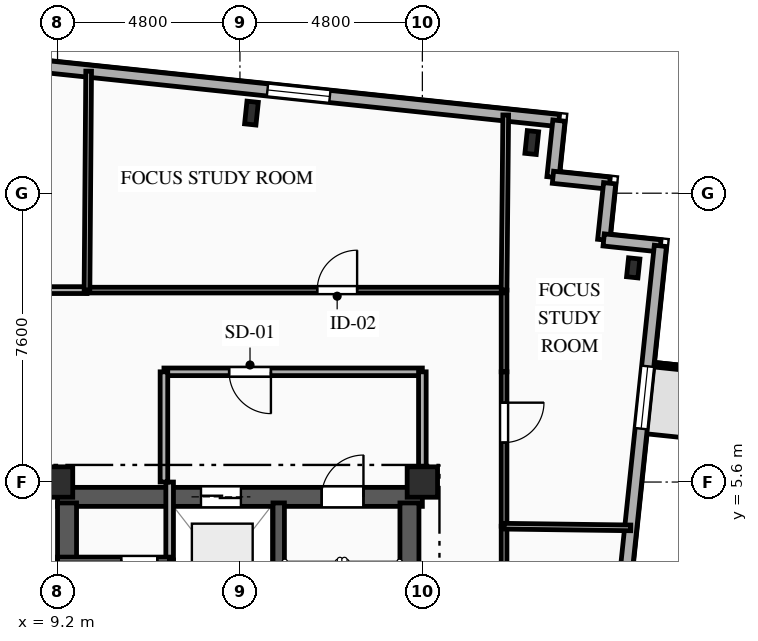
"""IFC4 building model, lengths in metres.
Left out: names, types, materials, properties, quantities, classifications, styles, units other than length and angle.
Written with IfcOpenShell. Run it as: python <this file> out.ifc"""

import sys

from ifc_helpers import new_model, si_unit, direction, frame, frame_2d, origin, origin_2d, place, context, subcontext, project, spatial, rectangle, i_section, extrude, element, fill, save


model = new_model("IFC4")
c1 = context("Model", 3, precision=1e-05, world=origin(), true_north=direction((0.0, 1.0)))
c2 = subcontext(c1, "Body", "Model", "MODEL_VIEW")
j1 = project(units=[si_unit("LENGTHUNIT", "METRE"), si_unit("PLANEANGLEUNIT", "RADIAN")], contexts=[c1])
p1 = place(None, origin())
s1 = spatial("IfcSite", under=j1, at=p1, CompositionType="ELEMENT")
p2 = place(p1, origin())
s2 = spatial("IfcBuilding", under=s1, at=p2, CompositionType="ELEMENT")
p3 = place(p2, frame((0.0, 0.0, 193.05)))
s3 = spatial("IfcBuildingStorey", under=s2, at=p3, CompositionType="ELEMENT", Elevation=193.05)
for number, where, z_axis, x_axis in (
    (1, (9.2, 5.6, 0.0), (0.0, 0.0, 1.0), (1.0, 0.0, 0.0)),
    (2, (18.8, 5.6, 0.0), (0.0, 0.0, 1.0), (1.0, 0.0, 0.0)),
):
    element("IfcColumn", number, at=place(p3, frame(where, z_axis=z_axis, x_axis=x_axis)), inside=s3, PredefinedType="COLUMN", context=c2, shape_type="SweptSolid", body=[
        extrude(rectangle(XDim=0.8, YDim=0.8, at=origin_2d()), origin(), (0.0, 0.0, 1.0), 3.35),
    ])
for number, where, z_axis, x_axis in (
    (3, (21.679, 14.532, 0.0), (0.0, 0.0, 1.0), (0.995, -0.105, 0.0)),
    (4, (14.303, 15.308, 0.0), (0.0, 0.0, 1.0), (0.995, -0.105, 0.0)),
):
    element("IfcColumn", number, at=place(p3, frame(where, z_axis=z_axis, x_axis=x_axis)), inside=s3, PredefinedType="COLUMN", context=c2, shape_type="SweptSolid", body=[
        extrude(i_section(OverallWidth=0.3, OverallDepth=0.6, WebThickness=0.015, FlangeThickness=0.03, FilletRadius=0.027, at=origin_2d()), origin(), (0.0, 0.0, 1.0), 3.35),
    ])
p4 = place(p3, frame((24.349, 11.235, 0.0), z_axis=(0.0, 0.0, 1.0), x_axis=(0.994521895368, -0.104528463268, 0.0)))
e5 = element("IfcColumn", 5, at=p4, inside=s3, PredefinedType="COLUMN", context=c2, shape_type="SweptSolid", body=[
    extrude(i_section(OverallWidth=0.3, OverallDepth=0.5, WebThickness=0.014, FlangeThickness=0.028, FilletRadius=0.027, at=origin_2d()), origin(), (0.0, 0.0, 1.0), 3.35),
])
p5 = place(p3, frame((-23.156, 19.898, 0.0), z_axis=(0.0, 0.0, 1.0), x_axis=(0.994522001802, -0.104527450613, 0.0)))
e6 = element("IfcWall", 6, at=p5, inside=s3, PredefinedType="SOLIDWALL", context=c2, shape_type="SweptSolid", body=[
    extrude(rectangle(XDim=45.8, YDim=0.32, at=frame_2d((22.9, 0.0))), origin(), (0.0, 0.0, 1.0), 3.04),
])
p6 = place(p5, frame((4.019, 0.0, 0.85)))
e7 = element("IfcOpeningElement", 7, at=p6, cuts=e6, PredefinedType="OPENING", context=c2, shape_type="SweptSolid", body=[
    extrude(rectangle(XDim=1.65, YDim=1.85, at=frame_2d((0.825, 0.925))), frame((0.0, 0.17, 0.0), z_axis=(0.0, -1.0, 0.0), x_axis=(1.0, 0.0, 0.0)), (0.0, 0.0, 1.0), 0.34),
])
p7 = place(p5, frame((9.024, 0.0, 0.85)))
e8 = element("IfcOpeningElement", 8, at=p7, cuts=e6, PredefinedType="OPENING", context=c2, shape_type="SweptSolid", body=[
    extrude(rectangle(XDim=1.65, YDim=1.85, at=frame_2d((0.825, 0.925))), frame((0.0, 0.17, 0.0), z_axis=(0.0, -1.0, 0.0), x_axis=(1.0, 0.0, 0.0)), (0.0, 0.0, 1.0), 0.34),
])
p8 = place(p5, frame((18.066, 0.0, 0.85)))
e9 = element("IfcOpeningElement", 9, at=p8, cuts=e6, PredefinedType="OPENING", context=c2, shape_type="SweptSolid", body=[
    extrude(rectangle(XDim=1.5, YDim=1.85, at=frame_2d((0.75, 0.925))), frame((0.0, 0.17, 0.0), z_axis=(0.0, -1.0, 0.0), x_axis=(1.0, 0.0, 0.0)), (0.0, 0.0, 1.0), 0.34),
])
p9 = place(p5, frame((27.045, 0.0, 0.85)))
e10 = element("IfcOpeningElement", 10, at=p9, cuts=e6, PredefinedType="OPENING", context=c2, shape_type="SweptSolid", body=[
    extrude(rectangle(XDim=2.2, YDim=1.85, at=frame_2d((1.1, 0.925))), frame((0.0, 0.17, 0.0), z_axis=(0.0, -1.0, 0.0), x_axis=(1.0, 0.0, 0.0)), (0.0, 0.0, 1.0), 0.34),
])
p10 = place(p5, frame((38.089, 0.0, 0.85)))
e11 = element("IfcOpeningElement", 11, at=p10, cuts=e6, PredefinedType="OPENING", context=c2, shape_type="SweptSolid", body=[
    extrude(rectangle(XDim=1.65, YDim=1.85, at=frame_2d((0.825, 0.925))), frame((0.0, 0.17, 0.0), z_axis=(0.0, -1.0, 0.0), x_axis=(1.0, 0.0, 0.0)), (0.0, 0.0, 1.0), 0.34),
])
p11 = place(p3, frame((22.393, 15.111, 0.0), z_axis=(0.0, 0.0, 1.0), x_axis=(-0.104481464157, -0.994526834051, 0.0)))
e12 = element("IfcWall", 12, at=p11, inside=s3, PredefinedType="SOLIDWALL", context=c2, shape_type="SweptSolid", body=[
    extrude(rectangle(XDim=1.5, YDim=0.32, at=frame_2d((0.75, 0.0))), origin(), (0.0, 0.0, 1.0), 3.04),
])
for number, where, z_axis, x_axis in (
    (13, (22.237, 13.619, 0.0), (0.0, 0.0, 1.0), (0.995, -0.104, 0.0)),
    (14, (23.728, 13.462, 0.0), (0.0, 0.0, 1.0), (-0.104, -0.995, 0.0)),
    (15, (23.572, 11.971, 0.0), (0.0, 0.0, 1.0), (0.995, -0.105, 0.0)),
):
    element("IfcWall", number, at=place(p3, frame(where, z_axis=z_axis, x_axis=x_axis)), inside=s3, PredefinedType="SOLIDWALL", context=c2, shape_type="SweptSolid", body=[
        extrude(rectangle(XDim=1.5, YDim=0.32, at=frame_2d((0.75, 0.0))), origin(), (0.0, 0.0, 1.0), 3.04),
    ])
p12 = place(p3, frame((25.063, 11.814, 0.0), z_axis=(0.0, 0.0, 1.0), x_axis=(-0.104523275986, -0.99452244056, 0.0)))
e16 = element("IfcWall", 16, at=p12, inside=s3, PredefinedType="SOLIDWALL", context=c2, shape_type="SweptSolid", body=[
    extrude(rectangle(XDim=28.8, YDim=0.32, at=frame_2d((14.4, 0.0))), origin(), (0.0, 0.0, 1.0), 3.04),
])
p13 = place(p12, frame((3.186, 0.0, 0.85)))
e17 = element("IfcOpeningElement", 17, at=p13, cuts=e16, PredefinedType="OPENING", context=c2, shape_type="SweptSolid", body=[
    extrude(rectangle(XDim=1.65, YDim=1.85, at=frame_2d((0.825, 0.925))), frame((0.0, 0.17, 0.0), z_axis=(0.0, -1.0, 0.0), x_axis=(1.0, 0.0, 0.0)), (0.0, 0.0, 1.0), 0.34),
])
p14 = place(p12, frame((11.93, 0.0, 0.85)))
e18 = element("IfcOpeningElement", 18, at=p14, cuts=e16, PredefinedType="OPENING", context=c2, shape_type="SweptSolid", body=[
    extrude(rectangle(XDim=1.65, YDim=1.85, at=frame_2d((0.825, 0.925))), frame((0.0, 0.17, 0.0), z_axis=(0.0, -1.0, 0.0), x_axis=(1.0, 0.0, 0.0)), (0.0, 0.0, 1.0), 0.34),
])
p15 = place(p12, frame((22.359, 0.0, 0.85)))
e19 = element("IfcOpeningElement", 19, at=p15, cuts=e16, PredefinedType="OPENING", context=c2, shape_type="SweptSolid", body=[
    extrude(rectangle(XDim=1.65, YDim=1.85, at=frame_2d((0.825, 0.925))), frame((0.0, 0.17, 0.0), z_axis=(0.0, -1.0, 0.0), x_axis=(1.0, 0.0, 0.0)), (0.0, 0.0, 1.0), 0.34),
])
p16 = place(p3, frame((9.2, 5.21, 0.0), z_axis=(0.0, 0.0, 1.0), x_axis=(1.0, 0.0, 0.0)))
e20 = element("IfcWall", 20, at=p16, inside=s3, PredefinedType="SHEAR", context=c2, shape_type="SweptSolid", body=[
    extrude(rectangle(XDim=9.6, YDim=0.5, at=frame_2d((4.8, 0.0))), origin(), (0.0, 0.0, 1.0), 3.04),
])
p17 = place(p16, frame((6.95, 0.0, 0.0)))
e21 = element("IfcOpeningElement", 21, at=p17, cuts=e20, PredefinedType="OPENING", context=c2, shape_type="SweptSolid", body=[
    extrude(rectangle(XDim=1.1, YDim=2.15, at=frame_2d((0.55, 1.075))), frame((0.0, 0.26, 0.0), z_axis=(0.0, -1.0, 0.0), x_axis=(1.0, 0.0, 0.0)), (0.0, 0.0, 1.0), 0.52),
])
p18 = place(p16, frame((3.775, 0.0, 0.0)))
e22 = element("IfcOpeningElement", 22, at=p18, cuts=e20, PredefinedType="OPENING", context=c2, shape_type="SweptSolid", body=[
    extrude(rectangle(XDim=1.05, YDim=2.1, at=frame_2d((0.525, 1.05))), frame((0.0, 0.26, 0.0), z_axis=(0.0, -1.0, 0.0), x_axis=(1.0, 0.0, 0.0)), (0.0, 0.0, 1.0), 0.52),
])
p19 = place(p3, frame((9.45, -5.05, 0.0), z_axis=(0.0, 0.0, 1.0), x_axis=(0.0, 1.0, 0.0)))
e23 = element("IfcWall", 23, at=p19, inside=s3, PredefinedType="SHEAR", context=c2, shape_type="SweptSolid", body=[
    extrude(rectangle(XDim=10.1, YDim=0.5, at=frame_2d((5.05, 0.0))), origin(), (0.0, 0.0, 1.0), 3.04),
])
p20 = place(p19, frame((7.15, 0.0, 0.0)))
e24 = element("IfcOpeningElement", 24, at=p20, cuts=e23, PredefinedType="OPENING", context=c2, shape_type="SweptSolid", body=[
    extrude(rectangle(XDim=0.9, YDim=2.1, at=frame_2d((0.45, 1.05))), frame((0.0, 0.26, 0.0), z_axis=(0.0, -1.0, 0.0), x_axis=(1.0, 0.0, 0.0)), (0.0, 0.0, 1.0), 0.52),
])
p21 = place(p19, frame((2.4, 0.0, 0.0)))
e25 = element("IfcOpeningElement", 25, at=p21, cuts=e23, PredefinedType="OPENING", context=c2, shape_type="SweptSolid", body=[
    extrude(rectangle(XDim=1.2, YDim=2.15, at=frame_2d((0.6, 1.075))), frame((0.0, 0.26, 0.0), z_axis=(0.0, -1.0, 0.0), x_axis=(1.0, 0.0, 0.0)), (0.0, 0.0, 1.0), 0.52),
])
p22 = place(p3, frame((18.46, -5.05, 0.0), z_axis=(0.0, 0.0, 1.0), x_axis=(0.0, 1.0, 0.0)))
e26 = element("IfcWall", 26, at=p22, inside=s3, PredefinedType="SHEAR", context=c2, shape_type="SweptSolid", body=[
    extrude(rectangle(XDim=10.1, YDim=0.5, at=frame_2d((5.05, 0.0))), origin(), (0.0, 0.0, 1.0), 3.04),
])
p23 = place(p3, frame((15.02, -5.05, 0.0), z_axis=(0.0, 0.0, 1.0), x_axis=(0.0, 1.0, 0.0)))
e27 = element("IfcWall", 27, at=p23, inside=s3, PredefinedType="SHEAR", context=c2, shape_type="SweptSolid", body=[
    extrude(rectangle(XDim=10.1, YDim=0.3, at=frame_2d((5.05, 0.0))), origin(), (0.0, 0.0, 1.0), 3.04),
])
p24 = place(p3, frame((12.15, 3.55, 0.0), z_axis=(0.0, 0.0, 1.0), x_axis=(0.0, -1.0, 0.0)))
e28 = element("IfcWall", 28, at=p24, inside=s3, PredefinedType="PARTITIONING", context=c2, shape_type="SweptSolid", body=[
    extrude(rectangle(XDim=2.0, YDim=0.2, at=frame_2d((1.0, 0.0))), origin(), (0.0, 0.0, 1.0), 3.04),
])
p25 = place(p3, frame((12.15, 5.6, 0.0), z_axis=(0.0, 0.0, 1.0), x_axis=(0.0, -1.0, 0.0)))
e29 = element("IfcWall", 29, at=p25, inside=s3, PredefinedType="PARTITIONING", context=c2, shape_type="SweptSolid", body=[
    extrude(rectangle(XDim=2.05, YDim=0.2, at=frame_2d((1.025, 0.0))), origin(), (0.0, 0.0, 1.0), 3.04),
])
p26 = place(p3, frame((18.8, 8.5, 0.0), z_axis=(0.0, 0.0, 1.0), x_axis=(-1.0, 0.0, 0.0)))
e30 = element("IfcWall", 30, at=p26, inside=s3, PredefinedType="PARTITIONING", context=c2, shape_type="SweptSolid", body=[
    extrude(rectangle(XDim=6.8, YDim=0.2, at=frame_2d((3.4, 0.0))), origin(), (0.0, 0.0, 1.0), 3.04),
])
p27 = place(p26, frame((3.985, 0.0, 0.0)))
e31 = element("IfcOpeningElement", 31, at=p27, cuts=e30, PredefinedType="OPENING", context=c2, shape_type="SweptSolid", body=[
    extrude(rectangle(XDim=1.1, YDim=2.15, at=frame_2d((0.55, 1.075))), frame((0.0, 0.11, 0.0), z_axis=(0.0, -1.0, 0.0), x_axis=(1.0, 0.0, 0.0)), (0.0, 0.0, 1.0), 0.22),
])
p28 = place(p3, frame((18.8, 5.6, 0.0), z_axis=(0.0, 0.0, 1.0), x_axis=(0.0, 1.0, 0.0)))
e32 = element("IfcWall", 32, at=p28, inside=s3, PredefinedType="PARTITIONING", context=c2, shape_type="SweptSolid", body=[
    extrude(rectangle(XDim=2.9, YDim=0.2, at=frame_2d((1.45, 0.0))), origin(), (0.0, 0.0, 1.0), 2.665),
])
p29 = place(p3, frame((12.0, 8.5, 0.0), z_axis=(0.0, 0.0, 1.0), x_axis=(0.0, -1.0, 0.0)))
e33 = element("IfcWall", 33, at=p29, inside=s3, PredefinedType="PARTITIONING", context=c2, shape_type="SweptSolid", body=[
    extrude(rectangle(XDim=2.9, YDim=0.2, at=frame_2d((1.45, 0.0))), origin(), (0.0, 0.0, 1.0), 3.04),
])
p30 = place(p3, frame((12.15, 3.55, 0.0), z_axis=(0.0, 0.0, 1.0), x_axis=(-1.0, 0.0, 0.0)))
e34 = element("IfcWall", 34, at=p30, inside=s3, PredefinedType="PARTITIONING", context=c2, shape_type="SweptSolid", body=[
    extrude(rectangle(XDim=2.95, YDim=0.15, at=frame_2d((1.475, 0.0))), origin(), (0.0, 0.0, 1.0), 3.04),
])
p31 = place(p30, frame((0.325, 0.0, 0.0)))
e35 = element("IfcOpeningElement", 35, at=p31, cuts=e34, PredefinedType="OPENING", context=c2, shape_type="SweptSolid", body=[
    extrude(rectangle(XDim=0.95, YDim=2.1, at=frame_2d((0.475, 1.05))), frame((0.0, 0.085, 0.0), z_axis=(0.0, -1.0, 0.0), x_axis=(1.0, 0.0, 0.0)), (0.0, 0.0, 1.0), 0.17),
])
p32 = place(p3, frame((20.95, 10.65, 0.0), z_axis=(0.0, 0.0, 1.0), x_axis=(0.0, -1.0, 0.0)))
e36 = element("IfcWall", 36, at=p32, inside=s3, PredefinedType="PARTITIONING", context=c2, shape_type="SweptSolid", body=[
    extrude(rectangle(XDim=2.15, YDim=0.15, at=frame_2d((1.075, 0.0))), origin(), (0.0, 0.0, 1.0), 3.04),
])
p33 = place(p3, frame((1.95, 10.65, 0.0), z_axis=(0.0, 0.0, 1.0), x_axis=(1.0, 0.0, 0.0)))
e37 = element("IfcWall", 37, at=p33, inside=s3, PredefinedType="PARTITIONING", context=c2, shape_type="SweptSolid", body=[
    extrude(rectangle(XDim=8.025, YDim=0.18, at=frame_2d((4.013, 0.0))), origin(), (0.0, 0.0, 1.0), 3.04),
])
p34 = place(p33, frame((1.313, 0.0, 0.0)))
e38 = element("IfcOpeningElement", 38, at=p34, cuts=e37, PredefinedType="OPENING", context=c2, shape_type="SweptSolid", body=[
    extrude(rectangle(XDim=1.0, YDim=2.15, at=frame_2d((0.5, 1.075))), frame((0.0, 0.1, 0.0), z_axis=(0.0, -1.0, 0.0), x_axis=(1.0, 0.0, 0.0)), (0.0, 0.0, 1.0), 0.2),
])
p35 = place(p3, frame((9.975, 10.65, 0.0), z_axis=(0.0, 0.0, 1.0), x_axis=(1.0, 0.0, 0.0)))
e39 = element("IfcWall", 39, at=p35, inside=s3, PredefinedType="PARTITIONING", context=c2, shape_type="SweptSolid", body=[
    extrude(rectangle(XDim=10.975, YDim=0.15, at=frame_2d((5.487, 0.0))), origin(), (0.0, 0.0, 1.0), 3.04),
])
p36 = place(p35, frame((6.058, 0.0, 0.0)))
e40 = element("IfcOpeningElement", 40, at=p36, cuts=e39, PredefinedType="OPENING", context=c2, shape_type="SweptSolid", body=[
    extrude(rectangle(XDim=1.05, YDim=2.15, at=frame_2d((0.525, 1.075))), frame((0.0, 0.085, 0.0), z_axis=(0.0, -1.0, 0.0), x_axis=(1.0, 0.0, 0.0)), (0.0, 0.0, 1.0), 0.17),
])
p37 = place(p3, frame((20.95, 4.438, 0.0), z_axis=(0.0, 0.0, 1.0), x_axis=(0.0, -1.0, 0.0)))
e41 = element("IfcWall", 41, at=p37, inside=s3, PredefinedType="PARTITIONING", context=c2, shape_type="SweptSolid", body=[
    extrude(rectangle(XDim=10.038, YDim=0.15, at=frame_2d((5.019, 0.0))), origin(), (0.0, 0.0, 1.0), 2.695),
])
p38 = place(p37, frame((5.472, 0.0, 0.0)))
e42 = element("IfcOpeningElement", 42, at=p38, cuts=e41, PredefinedType="OPENING", context=c2, shape_type="SweptSolid", body=[
    extrude(rectangle(XDim=1.05, YDim=2.15, at=frame_2d((0.525, 1.075))), frame((0.0, 0.085, 0.0), z_axis=(0.0, -1.0, 0.0), x_axis=(1.0, 0.0, 0.0)), (0.0, 0.0, 1.0), 0.17),
])
p39 = place(p3, frame((20.95, 8.5, 0.0), z_axis=(0.0, 0.0, 1.0), x_axis=(0.0, -1.0, 0.0)))
e43 = element("IfcWall", 43, at=p39, inside=s3, PredefinedType="PARTITIONING", context=c2, shape_type="SweptSolid", body=[
    extrude(rectangle(XDim=4.062, YDim=0.15, at=frame_2d((2.031, 0.0))), origin(), (0.0, 0.0, 1.0), 3.04),
])
p40 = place(p39, frame((0.812, 0.0, 0.0)))
e44 = element("IfcOpeningElement", 44, at=p40, cuts=e43, PredefinedType="OPENING", context=c2, shape_type="SweptSolid", body=[
    extrude(rectangle(XDim=1.05, YDim=2.15, at=frame_2d((0.525, 1.075))), frame((0.0, 0.085, 0.0), z_axis=(0.0, -1.0, 0.0), x_axis=(1.0, 0.0, 0.0)), (0.0, 0.0, 1.0), 0.17),
])
p41 = place(p3, frame((20.95, 4.438, 0.0), z_axis=(0.0, 0.0, 1.0), x_axis=(0.999913116238, -0.013181804667, 0.0)))
e45 = element("IfcWall", 45, at=p41, inside=s3, PredefinedType="PARTITIONING", context=c2, shape_type="SweptSolid", body=[
    extrude(rectangle(XDim=3.334, YDim=0.15, at=frame_2d((1.667, 0.0))), origin(), (0.0, 0.0, 1.0), 3.04),
])
p42 = place(p3, frame((20.95, 10.65, 0.0), z_axis=(0.0, 0.0, 1.0), x_axis=(0.009535990233, 0.999954531411, 0.0)))
e46 = element("IfcWall", 46, at=p42, inside=s3, PredefinedType="PARTITIONING", context=c2, shape_type="SweptSolid", body=[
    extrude(rectangle(XDim=4.608, YDim=0.15, at=frame_2d((2.304, 0.0))), origin(), (0.0, 0.0, 1.0), 2.665),
])
p43 = place(p3, frame((10.019, 16.412, 0.0), z_axis=(0.0, 0.0, 1.0), x_axis=(-0.007584527603, -0.999971237057, 0.0)))
e47 = element("IfcWall", 47, at=p43, inside=s3, PredefinedType="PARTITIONING", context=c2, shape_type="SweptSolid", body=[
    extrude(rectangle(XDim=5.762, YDim=0.15, at=frame_2d((2.881, 0.0))), origin(), (0.0, 0.0, 1.0), 3.04),
])
p44 = place(p10, origin())
e48 = element("IfcWindow", 48, at=p44, inside=s3, PartitioningType="SINGLE_PANEL", PredefinedType="WINDOW", context=c2, shape_type="SweptSolid", body=[
    extrude(rectangle(XDim=1.65, YDim=1.85, at=frame_2d((0.825, 0.925))), frame((0.0, 0.03, 0.0), z_axis=(0.0, -1.0, 0.0), x_axis=(1.0, 0.0, 0.0)), (0.0, 0.0, 1.0), 0.06),
])
fill(e11, e48)
p45 = place(p13, origin())
e49 = element("IfcWindow", 49, at=p45, inside=s3, PartitioningType="SINGLE_PANEL", PredefinedType="WINDOW", context=c2, shape_type="SweptSolid", body=[
    extrude(rectangle(XDim=1.65, YDim=1.85, at=frame_2d((0.825, 0.925))), frame((0.0, 0.03, 0.0), z_axis=(0.0, -1.0, 0.0), x_axis=(1.0, 0.0, 0.0)), (0.0, 0.0, 1.0), 0.06),
])
fill(e17, e49)
p46 = place(p17, origin())
e50 = element("IfcDoor", 50, at=p46, inside=s3, OperationType="SINGLE_SWING_RIGHT", PredefinedType="DOOR", context=c2, shape_type="SweptSolid", body=[
    extrude(rectangle(XDim=1.1, YDim=2.15, at=frame_2d((0.55, 1.075))), frame((0.0, 0.025, 0.0), z_axis=(0.0, -1.0, 0.0), x_axis=(1.0, 0.0, 0.0)), (0.0, 0.0, 1.0), 0.05),
])
fill(e21, e50)
p47 = place(p18, origin())
e51 = element("IfcDoor", 51, at=p47, inside=s3, OperationType="DOUBLE_DOOR_SLIDING", PredefinedType="DOOR", context=c2, shape_type="SweptSolid", body=[
    extrude(rectangle(XDim=1.05, YDim=2.1, at=frame_2d((0.525, 1.05))), frame((0.0, 0.025, 0.0), z_axis=(0.0, -1.0, 0.0), x_axis=(1.0, 0.0, 0.0)), (0.0, 0.0, 1.0), 0.05),
])
fill(e22, e51)
p48 = place(p27, origin())
e52 = element("IfcDoor", 52, at=p48, inside=s3, OperationType="SINGLE_SWING_LEFT", PredefinedType="DOOR", context=c2, shape_type="SweptSolid", body=[
    extrude(rectangle(XDim=1.1, YDim=2.15, at=frame_2d((0.55, 1.075))), frame((0.0, 0.025, 0.0), z_axis=(0.0, -1.0, 0.0), x_axis=(1.0, 0.0, 0.0)), (0.0, 0.0, 1.0), 0.05),
])
fill(e31, e52)
p49 = place(p31, origin())
e53 = element("IfcDoor", 53, at=p49, inside=s3, OperationType="SINGLE_SWING_RIGHT", PredefinedType="DOOR", context=c2, shape_type="SweptSolid", body=[
    extrude(rectangle(XDim=0.95, YDim=2.1, at=frame_2d((0.475, 1.05))), frame((0.0, 0.025, 0.0), z_axis=(0.0, -1.0, 0.0), x_axis=(1.0, 0.0, 0.0)), (0.0, 0.0, 1.0), 0.05),
])
fill(e35, e53)
p50 = place(p36, origin())
e54 = element("IfcDoor", 54, at=p50, inside=s3, OperationType="SINGLE_SWING_RIGHT", PredefinedType="DOOR", context=c2, shape_type="SweptSolid", body=[
    extrude(rectangle(XDim=1.05, YDim=2.15, at=frame_2d((0.525, 1.075))), frame((0.0, 0.025, 0.0), z_axis=(0.0, -1.0, 0.0), x_axis=(1.0, 0.0, 0.0)), (0.0, 0.0, 1.0), 0.05),
])
fill(e40, e54)
p51 = place(p40, origin())
e55 = element("IfcDoor", 55, at=p51, inside=s3, OperationType="SINGLE_SWING_LEFT", PredefinedType="DOOR", context=c2, shape_type="SweptSolid", body=[
    extrude(rectangle(XDim=1.05, YDim=2.15, at=frame_2d((0.525, 1.075))), frame((0.0, 0.025, 0.0), z_axis=(0.0, -1.0, 0.0), x_axis=(1.0, 0.0, 0.0)), (0.0, 0.0, 1.0), 0.05),
])
fill(e44, e55)
save(model, sys.argv[1])
